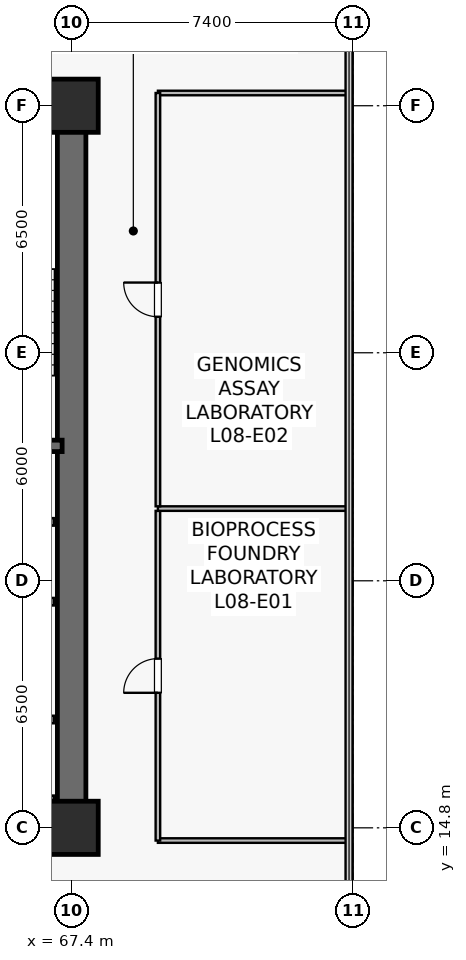
"""IFC4 building model, lengths in metres.
Left out: names, types, materials, properties, quantities, classifications, styles, units other than length and angle.
Written with IfcOpenShell. Run it as: python <this file> out.ifc"""

import sys

from ifc_helpers import new_model, si_unit, direction, frame, frame_2d, origin, origin_2d, place, context, subcontext, project, spatial, rectangle, extrude, source, transform, mapped, element, fill, save


model = new_model("IFC4")
c1 = context("Model", 3, precision=1e-05, world=origin(), true_north=direction((0.0, 1.0)))
c2 = subcontext(c1, "Body", "Model", "MODEL_VIEW")
j1 = project(units=[si_unit("LENGTHUNIT", "METRE"), si_unit("PLANEANGLEUNIT", "RADIAN")], contexts=[c1])
p1 = place(None, origin())
s1 = spatial("IfcSite", under=j1, at=p1, CompositionType="ELEMENT")
p2 = place(p1, origin())
s2 = spatial("IfcBuilding", under=s1, at=p2, CompositionType="ELEMENT")
p3 = place(p2, frame((0.0, 0.0, 33.4)))
s3 = spatial("IfcBuildingStorey", under=s2, at=p3, CompositionType="ELEMENT", Elevation=33.4)
p4 = place(p3, frame((52.225, 14.8, 0.0), z_axis=(0.0, 0.0, 1.0), x_axis=(1.0, 0.0, 0.0)))
e1 = element("IfcWall", 1, at=p4, inside=s3, PredefinedType="SHEAR", context=c2, shape_type="SweptSolid", body=[
    extrude(rectangle(XDim=15.55, YDim=0.75, at=frame_2d((7.775, 0.0))), origin(), (0.0, 0.0, 1.0), 3.78),
])
p5 = place(p3, frame((52.225, 33.8, 0.0), z_axis=(0.0, 0.0, 1.0), x_axis=(1.0, 0.0, 0.0)))
e2 = element("IfcWall", 2, at=p5, inside=s3, PredefinedType="SHEAR", context=c2, shape_type="SweptSolid", body=[
    extrude(rectangle(XDim=15.55, YDim=0.75, at=frame_2d((7.775, 0.0))), origin(), (0.0, 0.0, 1.0), 3.78),
])
p6 = place(p5, frame((9.3, 0.0, 0.0)))
e3 = element("IfcOpeningElement", 3, at=p6, cuts=e2, PredefinedType="OPENING", context=c2, shape_type="SweptSolid", body=[
    extrude(rectangle(XDim=0.95, YDim=2.15, at=frame_2d((0.475, 1.075))), frame((0.0, 0.385, 0.0), z_axis=(0.0, -1.0, 0.0), x_axis=(1.0, 0.0, 0.0)), (0.0, 0.0, 1.0), 0.77),
])
p7 = place(p5, frame((6.785, 0.0, 0.0)))
e4 = element("IfcOpeningElement", 4, at=p7, cuts=e2, PredefinedType="OPENING", context=c2, shape_type="SweptSolid", body=[
    extrude(rectangle(XDim=0.95, YDim=2.15, at=frame_2d((0.475, 1.075))), frame((0.0, 0.385, 0.0), z_axis=(0.0, -1.0, 0.0), x_axis=(1.0, 0.0, 0.0)), (0.0, 0.0, 1.0), 0.77),
])
p8 = place(p5, frame((4.235, 0.0, 0.0)))
e5 = element("IfcOpeningElement", 5, at=p8, cuts=e2, PredefinedType="OPENING", context=c2, shape_type="SweptSolid", body=[
    extrude(rectangle(XDim=0.95, YDim=2.15, at=frame_2d((0.475, 1.075))), frame((0.0, 0.385, 0.0), z_axis=(0.0, -1.0, 0.0), x_axis=(1.0, 0.0, 0.0)), (0.0, 0.0, 1.0), 0.77),
])
p9 = place(p5, frame((1.685, 0.0, 0.0)))
e6 = element("IfcOpeningElement", 6, at=p9, cuts=e2, PredefinedType="OPENING", context=c2, shape_type="SweptSolid", body=[
    extrude(rectangle(XDim=0.95, YDim=2.15, at=frame_2d((0.475, 1.075))), frame((0.0, 0.385, 0.0), z_axis=(0.0, -1.0, 0.0), x_axis=(1.0, 0.0, 0.0)), (0.0, 0.0, 1.0), 0.77),
])
p10 = place(p3, frame((67.4, 15.175, 0.0), z_axis=(0.0, 0.0, 1.0), x_axis=(0.0, 1.0, 0.0)))
e7 = element("IfcWall", 7, at=p10, inside=s3, PredefinedType="SHEAR", context=c2, shape_type="SweptSolid", body=[
    extrude(rectangle(XDim=18.25, YDim=0.75, at=frame_2d((9.125, 0.0))), origin(), (0.0, 0.0, 1.0), 3.78),
])
p11 = place(p3, frame((63.35, 24.85, 0.0), z_axis=(0.0, 0.0, 1.0), x_axis=(1.0, 0.0, 0.0)))
e8 = element("IfcWall", 8, at=p11, inside=s3, PredefinedType="SHEAR", context=c2, shape_type="SweptSolid", body=[
    extrude(rectangle(XDim=3.8, YDim=0.3, at=frame_2d((1.9, 0.0))), origin(), (0.0, 0.0, 1.0), 3.78),
])
p12 = place(p3, frame((63.35, 33.4, 0.0), z_axis=(0.0, 0.0, 1.0), x_axis=(1.0, 0.0, 0.0)))
e9 = element("IfcWall", 9, at=p12, inside=s3, PredefinedType="SOLIDWALL", context=c2, shape_type="SweptSolid", body=[
    extrude(rectangle(XDim=3.72, YDim=0.12, at=frame_2d((1.86, 0.0))), origin(), (0.0, 0.0, 1.0), 3.78),
])
m1 = source(origin(), c2, "Body", "SweptSolid", [
    extrude(rectangle(XDim=1.4, YDim=1.4, at=origin_2d()), origin(), (0.0, 0.0, 1.0), 4.1),
])
for number, where, z_axis, x_axis in (
    (10, (67.4, 14.8, 0.0), (0.0, 0.0, 1.0), (1.0, 0.0, 0.0)),
    (11, (67.4, 33.8, 0.0), (0.0, 0.0, 1.0), (1.0, 0.0, 0.0)),
):
    element("IfcColumn", number, at=place(p3, frame(where, z_axis=z_axis, x_axis=x_axis)), inside=s3, PredefinedType="COLUMN", context=c2, shape_type="MappedRepresentation", body=[
        mapped(m1, transform((0.0, 0.0, 0.0), scale=1.0)),
    ])
p13 = place(p3, frame((64.67, 17.65, 0.0), z_axis=(0.0, 0.0, 1.0), x_axis=(1.0, 0.0, 0.0)))
e12 = element("IfcWall", 12, at=p13, inside=s3, PredefinedType="SOLIDWALL", context=c2, shape_type="SweptSolid", body=[
    extrude(rectangle(XDim=2.26, YDim=0.2, at=frame_2d((1.13, 0.0))), origin(), (0.0, 0.0, 1.0), 3.78),
])
p14 = place(p13, frame((0.58, 0.0, 0.0)))
e13 = element("IfcOpeningElement", 13, at=p14, cuts=e12, PredefinedType="OPENING", context=c2, shape_type="SweptSolid", body=[
    extrude(rectangle(XDim=1.1, YDim=2.22, at=frame_2d((0.55, 1.11))), frame((0.0, 0.11, 0.0), z_axis=(0.0, -1.0, 0.0), x_axis=(1.0, 0.0, 0.0)), (0.0, 0.0, 1.0), 0.22),
])
for number, where, z_axis, x_axis in (
    (14, (64.67, 15.55, 0.0), (0.0, 0.0, 1.0), (1.0, 0.0, 0.0)),
    (15, (64.67, 20.75, 0.0), (0.0, 0.0, 1.0), (1.0, 0.0, 0.0)),
    (16, (64.67, 22.85, 0.0), (0.0, 0.0, 1.0), (1.0, 0.0, 0.0)),
):
    element("IfcWall", number, at=place(p3, frame(where, z_axis=z_axis, x_axis=x_axis)), inside=s3, PredefinedType="SOLIDWALL", context=c2, shape_type="SweptSolid", body=[
        extrude(rectangle(XDim=2.26, YDim=0.2, at=frame_2d((1.13, 0.0))), origin(), (0.0, 0.0, 1.0), 3.78),
    ])
for number, where, z_axis, x_axis in (
    (17, (69.67, 14.465, 0.0), (0.0, 0.0, 1.0), (1.0, 0.0, 0.0)),
    (18, (69.67, 34.135, 0.0), (0.0, 0.0, 1.0), (1.0, 0.0, 0.0)),
):
    element("IfcWall", number, at=place(p3, frame(where, z_axis=z_axis, x_axis=x_axis)), inside=s3, PredefinedType="PARTITIONING", context=c2, shape_type="SweptSolid", body=[
        extrude(rectangle(XDim=5.02, YDim=0.12, at=frame_2d((2.51, 0.0))), origin(), (0.0, 0.0, 1.0), 3.78),
    ])
p15 = place(p3, frame((69.67, 14.465, 0.0), z_axis=(0.0, 0.0, 1.0), x_axis=(0.0, 1.0, 0.0)))
e19 = element("IfcWall", 19, at=p15, inside=s3, PredefinedType="PARTITIONING", context=c2, shape_type="SweptSolid", body=[
    extrude(rectangle(XDim=8.675, YDim=0.12, at=frame_2d((4.337, 0.0))), origin(), (0.0, 0.0, 1.0), 3.78),
])
p16 = place(p15, frame((3.887, 0.0, 0.0)))
e20 = element("IfcOpeningElement", 20, at=p16, cuts=e19, PredefinedType="OPENING", context=c2, shape_type="SweptSolid", body=[
    extrude(rectangle(XDim=0.9, YDim=2.1, at=frame_2d((0.45, 1.05))), frame((0.0, 0.07, 0.0), z_axis=(0.0, -1.0, 0.0), x_axis=(1.0, 0.0, 0.0)), (0.0, 0.0, 1.0), 0.14),
])
p17 = place(p3, frame((69.67, 23.2, 0.0), z_axis=(0.0, 0.0, 1.0), x_axis=(1.0, 0.0, 0.0)))
e21 = element("IfcWall", 21, at=p17, inside=s3, PredefinedType="PARTITIONING", context=c2, shape_type="SweptSolid", body=[
    extrude(rectangle(XDim=5.02, YDim=0.12, at=frame_2d((2.51, 0.0))), origin(), (0.0, 0.0, 1.0), 3.78),
])
p18 = place(p3, frame((69.67, 23.26, 0.0), z_axis=(0.0, 0.0, 1.0), x_axis=(0.0, 1.0, 0.0)))
e22 = element("IfcWall", 22, at=p18, inside=s3, PredefinedType="PARTITIONING", context=c2, shape_type="SweptSolid", body=[
    extrude(rectangle(XDim=10.875, YDim=0.12, at=frame_2d((5.438, 0.0))), origin(), (0.0, 0.0, 1.0), 3.78),
])
p19 = place(p18, frame((4.988, 0.0, 0.0)))
e23 = element("IfcOpeningElement", 23, at=p19, cuts=e22, PredefinedType="OPENING", context=c2, shape_type="SweptSolid", body=[
    extrude(rectangle(XDim=0.9, YDim=2.1, at=frame_2d((0.45, 1.05))), frame((0.0, 0.07, 0.0), z_axis=(0.0, -1.0, 0.0), x_axis=(1.0, 0.0, 0.0)), (0.0, 0.0, 1.0), 0.14),
])
m2 = source(origin(), c2, "Body", "SweptSolid", [
    extrude(rectangle(XDim=0.9, YDim=2.1, at=frame_2d((0.45, 1.05))), frame((0.0, 0.025, 0.0), z_axis=(0.0, -1.0, 0.0), x_axis=(1.0, 0.0, 0.0)), (0.0, 0.0, 1.0), 0.05),
])
p20 = place(p16, origin())
e24 = element("IfcDoor", 24, at=p20, inside=s3, OperationType="SINGLE_SWING_LEFT", PredefinedType="DOOR", context=c2, shape_type="MappedRepresentation", body=[
    mapped(m2, transform((0.0, 0.0, 0.0), scale=1.0)),
])
fill(e20, e24)
p21 = place(p19, origin())
e25 = element("IfcDoor", 25, at=p21, inside=s3, OperationType="SINGLE_SWING_RIGHT", PredefinedType="DOOR", context=c2, shape_type="MappedRepresentation", body=[
    mapped(m2, transform((0.0, 0.0, 0.0), scale=1.0)),
])
fill(e23, e25)
save(model, sys.argv[1])
